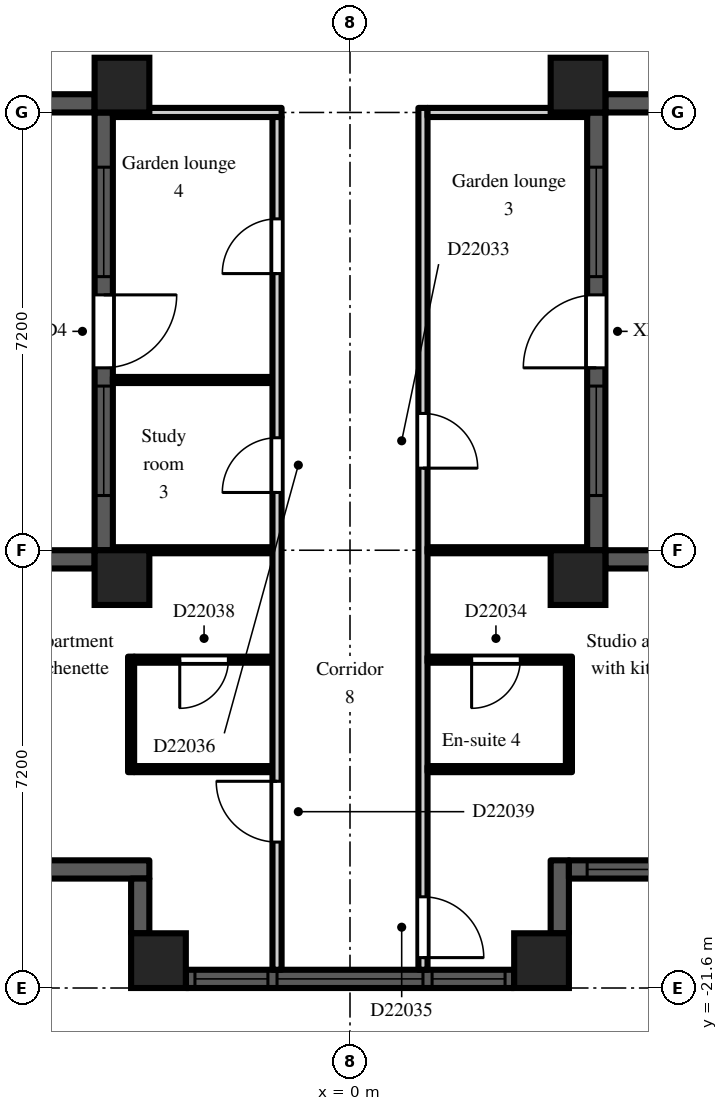
"""IFC4 building model, lengths in metres.
Left out: names, types, materials, properties, quantities, classifications, styles, units other than length and angle.
Written with IfcOpenShell. Run it as: python <this file> out.ifc"""

import sys

from ifc_helpers import new_model, si_unit, direction, frame, frame_2d, origin, origin_2d, place, context, subcontext, project, spatial, rectangle, extrude, element, fill, save


model = new_model("IFC4")
c1 = context("Model", 3, precision=1e-05, world=origin(), true_north=direction((0.0, 1.0)))
c2 = subcontext(c1, "Body", "Model", "MODEL_VIEW")
j1 = project(units=[si_unit("LENGTHUNIT", "METRE"), si_unit("PLANEANGLEUNIT", "RADIAN")], contexts=[c1])
p1 = place(None, origin())
s1 = spatial("IfcSite", under=j1, at=p1, CompositionType="ELEMENT")
p2 = place(p1, origin())
s2 = spatial("IfcBuilding", under=s1, at=p2, CompositionType="ELEMENT")
p3 = place(p2, frame((0.0, 0.0, 156.3)))
s3 = spatial("IfcBuildingStorey", under=s2, at=p3, CompositionType="ELEMENT", Elevation=156.3)
for number, where, z_axis, x_axis in (
    (1, (-3.75, -14.85, 0.0), (0.0, 0.0, 1.0), (1.0, 0.0, 0.0)),
    (2, (-3.75, -6.75, 0.0), (0.0, 0.0, 1.0), (1.0, 0.0, 0.0)),
    (3, (-3.15, -21.15, 0.0), (0.0, 0.0, 1.0), (1.0, 0.0, 0.0)),
    (4, (3.15, -21.15, 0.0), (0.0, 0.0, 1.0), (1.0, 0.0, 0.0)),
    (5, (3.75, -14.85, 0.0), (0.0, 0.0, 1.0), (1.0, 0.0, 0.0)),
    (6, (3.75, -6.75, 0.0), (0.0, 0.0, 1.0), (1.0, 0.0, 0.0)),
):
    element("IfcColumn", number, at=place(p3, frame(where, z_axis=z_axis, x_axis=x_axis)), inside=s3, PredefinedType="COLUMN", context=c2, shape_type="SweptSolid", body=[
        extrude(rectangle(XDim=0.9, YDim=0.9, at=origin_2d()), origin(), (0.0, 0.0, 1.0), 3.0),
    ])
p4 = place(p3, frame((-7.2, -7.05, 0.0), z_axis=(0.0, 0.0, 1.0), x_axis=(1.0, 0.0, 0.0)))
e7 = element("IfcWall", 7, at=p4, inside=s3, PredefinedType="SOLIDWALL", context=c2, shape_type="SweptSolid", body=[
    extrude(rectangle(XDim=3.0, YDim=0.3, at=frame_2d((1.5, 0.0))), origin(), (0.0, 0.0, 1.0), 2.2),
])
p5 = place(p3, frame((-4.05, -7.2, 0.0), z_axis=(0.0, 0.0, 1.0), x_axis=(0.0, -1.0, 0.0)))
e8 = element("IfcWall", 8, at=p5, inside=s3, PredefinedType="SOLIDWALL", context=c2, shape_type="SweptSolid", body=[
    extrude(rectangle(XDim=7.2, YDim=0.3, at=frame_2d((3.6, 0.0))), origin(), (0.0, 0.0, 1.0), 2.2),
])
p6 = place(p5, frame((3.0, 0.0, 0.0)))
e9 = element("IfcOpeningElement", 9, at=p6, cuts=e8, PredefinedType="OPENING", context=c2, shape_type="SweptSolid", body=[
    extrude(rectangle(XDim=1.2, YDim=2.05, at=frame_2d((0.6, 1.025))), frame((0.0, 0.16, 0.0), z_axis=(0.0, -1.0, 0.0), x_axis=(1.0, 0.0, 0.0)), (0.0, 0.0, 1.0), 0.32),
])
p7 = place(p5, frame((0.9, 0.0, 0.2)))
e10 = element("IfcOpeningElement", 10, at=p7, cuts=e8, PredefinedType="OPENING", context=c2, shape_type="SweptSolid", body=[
    extrude(rectangle(XDim=1.8, YDim=1.85, at=frame_2d((0.9, 0.925))), frame((0.0, 0.16, 0.0), z_axis=(0.0, -1.0, 0.0), x_axis=(1.0, 0.0, 0.0)), (0.0, 0.0, 1.0), 0.32),
])
p8 = place(p5, frame((4.5, 0.0, 0.2)))
e11 = element("IfcOpeningElement", 11, at=p8, cuts=e8, PredefinedType="OPENING", context=c2, shape_type="SweptSolid", body=[
    extrude(rectangle(XDim=1.8, YDim=1.85, at=frame_2d((0.9, 0.925))), frame((0.0, 0.16, 0.0), z_axis=(0.0, -1.0, 0.0), x_axis=(1.0, 0.0, 0.0)), (0.0, 0.0, 1.0), 0.32),
])
p9 = place(p3, frame((-4.2, -14.55, 0.0), z_axis=(0.0, 0.0, 1.0), x_axis=(-1.0, 0.0, 0.0)))
e12 = element("IfcWall", 12, at=p9, inside=s3, PredefinedType="SOLIDWALL", context=c2, shape_type="SweptSolid", body=[
    extrude(rectangle(XDim=2.1, YDim=0.3, at=frame_2d((1.05, 0.0))), origin(), (0.0, 0.0, 1.0), 2.2),
])
p10 = place(p3, frame((-5.1, -19.65, 0.0), z_axis=(0.0, 0.0, 1.0), x_axis=(1.0, 0.0, 0.0)))
e13 = element("IfcWall", 13, at=p10, inside=s3, PredefinedType="SOLIDWALL", context=c2, shape_type="SweptSolid", body=[
    extrude(rectangle(XDim=1.8, YDim=0.3, at=frame_2d((0.9, 0.0))), origin(), (0.0, 0.0, 1.0), 2.6),
])
p11 = place(p3, frame((-3.45, -19.8, 0.0), z_axis=(0.0, 0.0, 1.0), x_axis=(0.0, -1.0, 0.0)))
e14 = element("IfcWall", 14, at=p11, inside=s3, PredefinedType="SOLIDWALL", context=c2, shape_type="SweptSolid", body=[
    extrude(rectangle(XDim=0.9, YDim=0.3, at=frame_2d((0.45, 0.0))), origin(), (0.0, 0.0, 1.0), 2.6),
])
p12 = place(p3, frame((-2.7, -21.45, 0.0), z_axis=(0.0, 0.0, 1.0), x_axis=(1.0, 0.0, 0.0)))
e15 = element("IfcWall", 15, at=p12, inside=s3, PredefinedType="SOLIDWALL", context=c2, shape_type="SweptSolid", body=[
    extrude(rectangle(XDim=5.4, YDim=0.3, at=frame_2d((2.7, 0.0))), origin(), (0.0, 0.0, 1.0), 2.2),
])
p13 = place(p12, frame((1.5, 0.0, 0.2)))
e16 = element("IfcOpeningElement", 16, at=p13, cuts=e15, PredefinedType="OPENING", context=c2, shape_type="SweptSolid", body=[
    extrude(rectangle(XDim=2.4, YDim=1.85, at=frame_2d((1.2, 0.925))), frame((0.0, 0.16, 0.0), z_axis=(0.0, -1.0, 0.0), x_axis=(1.0, 0.0, 0.0)), (0.0, 0.0, 1.0), 0.32),
])
p14 = place(p12, frame((0.15, 0.0, 0.2)))
e17 = element("IfcOpeningElement", 17, at=p14, cuts=e15, PredefinedType="OPENING", context=c2, shape_type="SweptSolid", body=[
    extrude(rectangle(XDim=1.2, YDim=1.85, at=frame_2d((0.6, 0.925))), frame((0.0, 0.16, 0.0), z_axis=(0.0, -1.0, 0.0), x_axis=(1.0, 0.0, 0.0)), (0.0, 0.0, 1.0), 0.32),
])
p15 = place(p12, frame((4.05, 0.0, 0.2)))
e18 = element("IfcOpeningElement", 18, at=p15, cuts=e15, PredefinedType="OPENING", context=c2, shape_type="SweptSolid", body=[
    extrude(rectangle(XDim=1.2, YDim=1.85, at=frame_2d((0.6, 0.925))), frame((0.0, 0.16, 0.0), z_axis=(0.0, -1.0, 0.0), x_axis=(1.0, 0.0, 0.0)), (0.0, 0.0, 1.0), 0.32),
])
p16 = place(p3, frame((3.45, -20.7, 0.0), z_axis=(0.0, 0.0, 1.0), x_axis=(0.0, 1.0, 0.0)))
e19 = element("IfcWall", 19, at=p16, inside=s3, PredefinedType="SOLIDWALL", context=c2, shape_type="SweptSolid", body=[
    extrude(rectangle(XDim=1.2, YDim=0.3, at=frame_2d((0.6, 0.0))), origin(), (0.0, 0.0, 1.0), 2.6),
])
p17 = place(p3, frame((3.6, -19.65, 0.0), z_axis=(0.0, 0.0, 1.0), x_axis=(1.0, 0.0, 0.0)))
e20 = element("IfcWall", 20, at=p17, inside=s3, PredefinedType="SOLIDWALL", context=c2, shape_type="SweptSolid", body=[
    extrude(rectangle(XDim=1.8, YDim=0.3, at=frame_2d((0.9, 0.0))), origin(), (0.0, 0.0, 1.0), 2.6),
])
p18 = place(p17, frame((0.3, 0.0, 0.2)))
e21 = element("IfcOpeningElement", 21, at=p18, cuts=e20, PredefinedType="OPENING", context=c2, shape_type="SweptSolid", body=[
    extrude(rectangle(XDim=1.2, YDim=1.85, at=frame_2d((0.6, 0.925))), frame((0.0, 0.16, 0.0), z_axis=(0.0, -1.0, 0.0), x_axis=(1.0, 0.0, 0.0)), (0.0, 0.0, 1.0), 0.32),
])
p19 = place(p3, frame((6.3, -14.55, 0.0), z_axis=(0.0, 0.0, 1.0), x_axis=(-1.0, 0.0, 0.0)))
e22 = element("IfcWall", 22, at=p19, inside=s3, PredefinedType="SOLIDWALL", context=c2, shape_type="SweptSolid", body=[
    extrude(rectangle(XDim=2.1, YDim=0.3, at=frame_2d((1.05, 0.0))), origin(), (0.0, 0.0, 1.0), 2.2),
])
p20 = place(p3, frame((4.05, -14.4, 0.0), z_axis=(0.0, 0.0, 1.0), x_axis=(0.0, 1.0, 0.0)))
e23 = element("IfcWall", 23, at=p20, inside=s3, PredefinedType="SOLIDWALL", context=c2, shape_type="SweptSolid", body=[
    extrude(rectangle(XDim=7.2, YDim=0.3, at=frame_2d((3.6, 0.0))), origin(), (0.0, 0.0, 1.0), 2.2),
])
p21 = place(p20, frame((3.0, 0.0, 0.0)))
e24 = element("IfcOpeningElement", 24, at=p21, cuts=e23, PredefinedType="OPENING", context=c2, shape_type="SweptSolid", body=[
    extrude(rectangle(XDim=1.2, YDim=2.05, at=frame_2d((0.6, 1.025))), frame((0.0, 0.16, 0.0), z_axis=(0.0, -1.0, 0.0), x_axis=(1.0, 0.0, 0.0)), (0.0, 0.0, 1.0), 0.32),
])
p22 = place(p20, frame((0.9, 0.0, 0.2)))
e25 = element("IfcOpeningElement", 25, at=p22, cuts=e23, PredefinedType="OPENING", context=c2, shape_type="SweptSolid", body=[
    extrude(rectangle(XDim=1.8, YDim=1.85, at=frame_2d((0.9, 0.925))), frame((0.0, 0.16, 0.0), z_axis=(0.0, -1.0, 0.0), x_axis=(1.0, 0.0, 0.0)), (0.0, 0.0, 1.0), 0.32),
])
p23 = place(p20, frame((4.5, 0.0, 0.2)))
e26 = element("IfcOpeningElement", 26, at=p23, cuts=e23, PredefinedType="OPENING", context=c2, shape_type="SweptSolid", body=[
    extrude(rectangle(XDim=1.8, YDim=1.85, at=frame_2d((0.9, 0.925))), frame((0.0, 0.16, 0.0), z_axis=(0.0, -1.0, 0.0), x_axis=(1.0, 0.0, 0.0)), (0.0, 0.0, 1.0), 0.32),
])
p24 = place(p3, frame((4.2, -7.05, 0.0), z_axis=(0.0, 0.0, 1.0), x_axis=(1.0, 0.0, 0.0)))
e27 = element("IfcWall", 27, at=p24, inside=s3, PredefinedType="SOLIDWALL", context=c2, shape_type="SweptSolid", body=[
    extrude(rectangle(XDim=3.0, YDim=0.3, at=frame_2d((1.5, 0.0))), origin(), (0.0, 0.0, 1.0), 2.2),
])
for number, where, z_axis, x_axis in (
    (28, (-3.9, -14.4, 0.0), (0.0, 0.0, 1.0), (1.0, 0.0, 0.0)),
    (29, (-3.9, -11.6, 0.0), (0.0, 0.0, 1.0), (1.0, 0.0, 0.0)),
):
    element("IfcWall", number, at=place(p3, frame(where, z_axis=z_axis, x_axis=x_axis)), inside=s3, PredefinedType="PARTITIONING", context=c2, shape_type="SweptSolid", body=[
        extrude(rectangle(XDim=2.625, YDim=0.1, at=frame_2d((1.312, 0.0))), origin(), (0.0, 0.0, 1.0), 2.6),
    ])
p25 = place(p3, frame((-3.9, -7.2, 0.0), z_axis=(0.0, 0.0, 1.0), x_axis=(1.0, 0.0, 0.0)))
e30 = element("IfcWall", 30, at=p25, inside=s3, PredefinedType="PARTITIONING", context=c2, shape_type="SweptSolid", body=[
    extrude(rectangle(XDim=2.775, YDim=0.15, at=frame_2d((1.387, 0.0))), origin(), (0.0, 0.0, 1.0), 2.6),
])
p26 = place(p3, frame((-3.6, -18.05, 0.0), z_axis=(0.0, 0.0, 1.0), x_axis=(0.0, 1.0, 0.0)))
e31 = element("IfcWall", 31, at=p26, inside=s3, PredefinedType="PARTITIONING", context=c2, shape_type="SweptSolid", body=[
    extrude(rectangle(XDim=1.9, YDim=0.1, at=frame_2d((0.95, 0.0))), origin(), (0.0, 0.0, 1.0), 2.6),
])
p27 = place(p3, frame((-3.55, -18.0, 0.0), z_axis=(0.0, 0.0, 1.0), x_axis=(1.0, 0.0, 0.0)))
e32 = element("IfcWall", 32, at=p27, inside=s3, PredefinedType="PARTITIONING", context=c2, shape_type="SweptSolid", body=[
    extrude(rectangle(XDim=2.275, YDim=0.1, at=frame_2d((1.138, 0.0))), origin(), (0.0, 0.0, 1.0), 2.6),
])
p28 = place(p3, frame((-3.55, -16.2, 0.0), z_axis=(0.0, 0.0, 1.0), x_axis=(1.0, 0.0, 0.0)))
e33 = element("IfcWall", 33, at=p28, inside=s3, PredefinedType="PARTITIONING", context=c2, shape_type="SweptSolid", body=[
    extrude(rectangle(XDim=2.275, YDim=0.1, at=frame_2d((1.138, 0.0))), origin(), (0.0, 0.0, 1.0), 2.6),
])
p29 = place(p28, frame((0.75, 0.0, 0.0)))
e34 = element("IfcOpeningElement", 34, at=p29, cuts=e33, PredefinedType="OPENING", context=c2, shape_type="SweptSolid", body=[
    extrude(rectangle(XDim=0.8, YDim=2.1, at=frame_2d((0.4, 1.05))), frame((0.0, 0.06, 0.0), z_axis=(0.0, -1.0, 0.0), x_axis=(1.0, 0.0, 0.0)), (0.0, 0.0, 1.0), 0.12),
])
p30 = place(p3, frame((-1.2, -21.3, 0.0), z_axis=(0.0, 0.0, 1.0), x_axis=(0.0, 1.0, 0.0)))
e35 = element("IfcWall", 35, at=p30, inside=s3, PredefinedType="PARTITIONING", context=c2, shape_type="SweptSolid", body=[
    extrude(rectangle(XDim=14.025, YDim=0.15, at=frame_2d((7.013, 0.0))), origin(), (0.0, 0.0, 1.0), 2.6),
])
p31 = place(p30, frame((7.85, 0.0, 0.0)))
e36 = element("IfcOpeningElement", 36, at=p31, cuts=e35, PredefinedType="OPENING", context=c2, shape_type="SweptSolid", body=[
    extrude(rectangle(XDim=0.9, YDim=2.1, at=frame_2d((0.45, 1.05))), frame((0.0, 0.085, 0.0), z_axis=(0.0, -1.0, 0.0), x_axis=(1.0, 0.0, 0.0)), (0.0, 0.0, 1.0), 0.17),
])
p32 = place(p30, frame((11.45, 0.0, 0.0)))
e37 = element("IfcOpeningElement", 37, at=p32, cuts=e35, PredefinedType="OPENING", context=c2, shape_type="SweptSolid", body=[
    extrude(rectangle(XDim=0.9, YDim=2.1, at=frame_2d((0.45, 1.05))), frame((0.0, 0.085, 0.0), z_axis=(0.0, -1.0, 0.0), x_axis=(1.0, 0.0, 0.0)), (0.0, 0.0, 1.0), 0.17),
])
p33 = place(p30, frame((2.1, 0.0, 0.0)))
e38 = element("IfcOpeningElement", 38, at=p33, cuts=e35, PredefinedType="OPENING", context=c2, shape_type="SweptSolid", body=[
    extrude(rectangle(XDim=1.0, YDim=2.1, at=frame_2d((0.5, 1.05))), frame((0.0, 0.085, 0.0), z_axis=(0.0, -1.0, 0.0), x_axis=(1.0, 0.0, 0.0)), (0.0, 0.0, 1.0), 0.17),
])
p34 = place(p3, frame((1.2, -21.3, 0.0), z_axis=(0.0, 0.0, 1.0), x_axis=(0.0, 1.0, 0.0)))
e39 = element("IfcWall", 39, at=p34, inside=s3, PredefinedType="PARTITIONING", context=c2, shape_type="SweptSolid", body=[
    extrude(rectangle(XDim=14.175, YDim=0.15, at=frame_2d((7.087, 0.0))), origin(), (0.0, 0.0, 1.0), 2.6),
])
p35 = place(p34, frame((8.25, 0.0, 0.0)))
e40 = element("IfcOpeningElement", 40, at=p35, cuts=e39, PredefinedType="OPENING", context=c2, shape_type="SweptSolid", body=[
    extrude(rectangle(XDim=0.9, YDim=2.1, at=frame_2d((0.45, 1.05))), frame((0.0, 0.085, 0.0), z_axis=(0.0, -1.0, 0.0), x_axis=(1.0, 0.0, 0.0)), (0.0, 0.0, 1.0), 0.17),
])
p36 = place(p34, frame((0.2, 0.0, 0.0)))
e41 = element("IfcOpeningElement", 41, at=p36, cuts=e39, PredefinedType="OPENING", context=c2, shape_type="SweptSolid", body=[
    extrude(rectangle(XDim=1.0, YDim=2.1, at=frame_2d((0.5, 1.05))), frame((0.0, 0.085, 0.0), z_axis=(0.0, -1.0, 0.0), x_axis=(1.0, 0.0, 0.0)), (0.0, 0.0, 1.0), 0.17),
])
p37 = place(p3, frame((1.275, -18.0, 0.0), z_axis=(0.0, 0.0, 1.0), x_axis=(1.0, 0.0, 0.0)))
e42 = element("IfcWall", 42, at=p37, inside=s3, PredefinedType="PARTITIONING", context=c2, shape_type="SweptSolid", body=[
    extrude(rectangle(XDim=2.375, YDim=0.1, at=frame_2d((1.188, 0.0))), origin(), (0.0, 0.0, 1.0), 2.6),
])
p38 = place(p3, frame((1.275, -16.2, 0.0), z_axis=(0.0, 0.0, 1.0), x_axis=(1.0, 0.0, 0.0)))
e43 = element("IfcWall", 43, at=p38, inside=s3, PredefinedType="PARTITIONING", context=c2, shape_type="SweptSolid", body=[
    extrude(rectangle(XDim=2.375, YDim=0.1, at=frame_2d((1.188, 0.0))), origin(), (0.0, 0.0, 1.0), 2.6),
])
p39 = place(p38, frame((0.725, 0.0, 0.0)))
e44 = element("IfcOpeningElement", 44, at=p39, cuts=e43, PredefinedType="OPENING", context=c2, shape_type="SweptSolid", body=[
    extrude(rectangle(XDim=0.8, YDim=2.1, at=frame_2d((0.4, 1.05))), frame((0.0, 0.06, 0.0), z_axis=(0.0, -1.0, 0.0), x_axis=(1.0, 0.0, 0.0)), (0.0, 0.0, 1.0), 0.12),
])
p40 = place(p3, frame((1.275, -14.4, 0.0), z_axis=(0.0, 0.0, 1.0), x_axis=(1.0, 0.0, 0.0)))
e45 = element("IfcWall", 45, at=p40, inside=s3, PredefinedType="PARTITIONING", context=c2, shape_type="SweptSolid", body=[
    extrude(rectangle(XDim=2.625, YDim=0.1, at=frame_2d((1.312, 0.0))), origin(), (0.0, 0.0, 1.0), 2.6),
])
p41 = place(p3, frame((1.275, -7.2, 0.0), z_axis=(0.0, 0.0, 1.0), x_axis=(1.0, 0.0, 0.0)))
e46 = element("IfcWall", 46, at=p41, inside=s3, PredefinedType="PARTITIONING", context=c2, shape_type="SweptSolid", body=[
    extrude(rectangle(XDim=2.625, YDim=0.15, at=frame_2d((1.312, 0.0))), origin(), (0.0, 0.0, 1.0), 2.6),
])
p42 = place(p3, frame((3.6, -17.95, 0.0), z_axis=(0.0, 0.0, 1.0), x_axis=(0.0, 1.0, 0.0)))
e47 = element("IfcWall", 47, at=p42, inside=s3, PredefinedType="PARTITIONING", context=c2, shape_type="SweptSolid", body=[
    extrude(rectangle(XDim=1.7, YDim=0.1, at=frame_2d((0.85, 0.0))), origin(), (0.0, 0.0, 1.0), 2.6),
])
p43 = place(p6, origin())
e48 = element("IfcDoor", 48, at=p43, inside=s3, OperationType="SINGLE_SWING_LEFT", PredefinedType="DOOR", context=c2, shape_type="SweptSolid", body=[
    extrude(rectangle(XDim=1.2, YDim=2.05, at=frame_2d((0.6, 1.025))), frame((0.0, 0.025, 0.0), z_axis=(0.0, -1.0, 0.0), x_axis=(1.0, 0.0, 0.0)), (0.0, 0.0, 1.0), 0.05),
])
fill(e9, e48)
p44 = place(p7, origin())
e49 = element("IfcWindow", 49, at=p44, inside=s3, PartitioningType="SINGLE_PANEL", PredefinedType="WINDOW", context=c2, shape_type="SweptSolid", body=[
    extrude(rectangle(XDim=1.8, YDim=1.85, at=frame_2d((0.9, 0.925))), frame((0.0, 0.03, 0.0), z_axis=(0.0, -1.0, 0.0), x_axis=(1.0, 0.0, 0.0)), (0.0, 0.0, 1.0), 0.06),
])
fill(e10, e49)
p45 = place(p8, origin())
e50 = element("IfcWindow", 50, at=p45, inside=s3, PartitioningType="SINGLE_PANEL", PredefinedType="WINDOW", context=c2, shape_type="SweptSolid", body=[
    extrude(rectangle(XDim=1.8, YDim=1.85, at=frame_2d((0.9, 0.925))), frame((0.0, 0.03, 0.0), z_axis=(0.0, -1.0, 0.0), x_axis=(1.0, 0.0, 0.0)), (0.0, 0.0, 1.0), 0.06),
])
fill(e11, e50)
p46 = place(p13, origin())
e51 = element("IfcWindow", 51, at=p46, inside=s3, PartitioningType="SINGLE_PANEL", PredefinedType="WINDOW", context=c2, shape_type="SweptSolid", body=[
    extrude(rectangle(XDim=2.4, YDim=1.85, at=frame_2d((1.2, 0.925))), frame((0.0, 0.03, 0.0), z_axis=(0.0, -1.0, 0.0), x_axis=(1.0, 0.0, 0.0)), (0.0, 0.0, 1.0), 0.06),
])
fill(e16, e51)
p47 = place(p14, origin())
e52 = element("IfcWindow", 52, at=p47, inside=s3, PartitioningType="SINGLE_PANEL", PredefinedType="WINDOW", context=c2, shape_type="SweptSolid", body=[
    extrude(rectangle(XDim=1.2, YDim=1.85, at=frame_2d((0.6, 0.925))), frame((0.0, 0.03, 0.0), z_axis=(0.0, -1.0, 0.0), x_axis=(1.0, 0.0, 0.0)), (0.0, 0.0, 1.0), 0.06),
])
fill(e17, e52)
p48 = place(p15, origin())
e53 = element("IfcWindow", 53, at=p48, inside=s3, PartitioningType="SINGLE_PANEL", PredefinedType="WINDOW", context=c2, shape_type="SweptSolid", body=[
    extrude(rectangle(XDim=1.2, YDim=1.85, at=frame_2d((0.6, 0.925))), frame((0.0, 0.03, 0.0), z_axis=(0.0, -1.0, 0.0), x_axis=(1.0, 0.0, 0.0)), (0.0, 0.0, 1.0), 0.06),
])
fill(e18, e53)
p49 = place(p18, origin())
e54 = element("IfcWindow", 54, at=p49, inside=s3, PartitioningType="SINGLE_PANEL", PredefinedType="WINDOW", context=c2, shape_type="SweptSolid", body=[
    extrude(rectangle(XDim=1.2, YDim=1.85, at=frame_2d((0.6, 0.925))), frame((0.0, 0.03, 0.0), z_axis=(0.0, -1.0, 0.0), x_axis=(1.0, 0.0, 0.0)), (0.0, 0.0, 1.0), 0.06),
])
fill(e21, e54)
p50 = place(p21, origin())
e55 = element("IfcDoor", 55, at=p50, inside=s3, OperationType="SINGLE_SWING_LEFT", PredefinedType="DOOR", context=c2, shape_type="SweptSolid", body=[
    extrude(rectangle(XDim=1.2, YDim=2.05, at=frame_2d((0.6, 1.025))), frame((0.0, 0.025, 0.0), z_axis=(0.0, -1.0, 0.0), x_axis=(1.0, 0.0, 0.0)), (0.0, 0.0, 1.0), 0.05),
])
fill(e24, e55)
p51 = place(p22, origin())
e56 = element("IfcWindow", 56, at=p51, inside=s3, PartitioningType="SINGLE_PANEL", PredefinedType="WINDOW", context=c2, shape_type="SweptSolid", body=[
    extrude(rectangle(XDim=1.8, YDim=1.85, at=frame_2d((0.9, 0.925))), frame((0.0, 0.03, 0.0), z_axis=(0.0, -1.0, 0.0), x_axis=(1.0, 0.0, 0.0)), (0.0, 0.0, 1.0), 0.06),
])
fill(e25, e56)
p52 = place(p23, origin())
e57 = element("IfcWindow", 57, at=p52, inside=s3, PartitioningType="SINGLE_PANEL", PredefinedType="WINDOW", context=c2, shape_type="SweptSolid", body=[
    extrude(rectangle(XDim=1.8, YDim=1.85, at=frame_2d((0.9, 0.925))), frame((0.0, 0.03, 0.0), z_axis=(0.0, -1.0, 0.0), x_axis=(1.0, 0.0, 0.0)), (0.0, 0.0, 1.0), 0.06),
])
fill(e26, e57)
p53 = place(p35, frame((0.9, 0.0, 0.0), z_axis=(0.0, 0.0, 1.0), x_axis=(-1.0, 0.0, 0.0)))
e58 = element("IfcDoor", 58, at=p53, inside=s3, OperationType="SINGLE_SWING_RIGHT", PredefinedType="DOOR", context=c2, shape_type="SweptSolid", body=[
    extrude(rectangle(XDim=0.9, YDim=2.1, at=frame_2d((0.45, 1.05))), frame((0.0, 0.025, 0.0), z_axis=(0.0, -1.0, 0.0), x_axis=(1.0, 0.0, 0.0)), (0.0, 0.0, 1.0), 0.05),
])
fill(e40, e58)
p54 = place(p39, frame((0.8, 0.0, 0.0), z_axis=(0.0, 0.0, 1.0), x_axis=(-1.0, 0.0, 0.0)))
e59 = element("IfcDoor", 59, at=p54, inside=s3, OperationType="SINGLE_SWING_RIGHT", PredefinedType="DOOR", context=c2, shape_type="SweptSolid", body=[
    extrude(rectangle(XDim=0.8, YDim=2.1, at=frame_2d((0.4, 1.05))), frame((0.0, 0.025, 0.0), z_axis=(0.0, -1.0, 0.0), x_axis=(1.0, 0.0, 0.0)), (0.0, 0.0, 1.0), 0.05),
])
fill(e44, e59)
p55 = place(p36, frame((1.0, 0.0, 0.0), z_axis=(0.0, 0.0, 1.0), x_axis=(-1.0, 0.0, 0.0)))
e60 = element("IfcDoor", 60, at=p55, inside=s3, OperationType="SINGLE_SWING_RIGHT", PredefinedType="DOOR", context=c2, shape_type="SweptSolid", body=[
    extrude(rectangle(XDim=1.0, YDim=2.1, at=frame_2d((0.5, 1.05))), frame((0.0, 0.025, 0.0), z_axis=(0.0, -1.0, 0.0), x_axis=(1.0, 0.0, 0.0)), (0.0, 0.0, 1.0), 0.05),
])
fill(e41, e60)
p56 = place(p31, origin())
e61 = element("IfcDoor", 61, at=p56, inside=s3, OperationType="SINGLE_SWING_LEFT", PredefinedType="DOOR", context=c2, shape_type="SweptSolid", body=[
    extrude(rectangle(XDim=0.9, YDim=2.1, at=frame_2d((0.45, 1.05))), frame((0.0, 0.025, 0.0), z_axis=(0.0, -1.0, 0.0), x_axis=(1.0, 0.0, 0.0)), (0.0, 0.0, 1.0), 0.05),
])
fill(e36, e61)
p57 = place(p32, origin())
e62 = element("IfcDoor", 62, at=p57, inside=s3, OperationType="SINGLE_SWING_LEFT", PredefinedType="DOOR", context=c2, shape_type="SweptSolid", body=[
    extrude(rectangle(XDim=0.9, YDim=2.1, at=frame_2d((0.45, 1.05))), frame((0.0, 0.025, 0.0), z_axis=(0.0, -1.0, 0.0), x_axis=(1.0, 0.0, 0.0)), (0.0, 0.0, 1.0), 0.05),
])
fill(e37, e62)
p58 = place(p29, frame((0.8, 0.0, 0.0), z_axis=(0.0, 0.0, 1.0), x_axis=(-1.0, 0.0, 0.0)))
e63 = element("IfcDoor", 63, at=p58, inside=s3, OperationType="SINGLE_SWING_RIGHT", PredefinedType="DOOR", context=c2, shape_type="SweptSolid", body=[
    extrude(rectangle(XDim=0.8, YDim=2.1, at=frame_2d((0.4, 1.05))), frame((0.0, 0.025, 0.0), z_axis=(0.0, -1.0, 0.0), x_axis=(1.0, 0.0, 0.0)), (0.0, 0.0, 1.0), 0.05),
])
fill(e34, e63)
p59 = place(p33, origin())
e64 = element("IfcDoor", 64, at=p59, inside=s3, OperationType="SINGLE_SWING_RIGHT", PredefinedType="DOOR", context=c2, shape_type="SweptSolid", body=[
    extrude(rectangle(XDim=1.0, YDim=2.1, at=frame_2d((0.5, 1.05))), frame((0.0, 0.025, 0.0), z_axis=(0.0, -1.0, 0.0), x_axis=(1.0, 0.0, 0.0)), (0.0, 0.0, 1.0), 0.05),
])
fill(e38, e64)
save(model, sys.argv[1])
